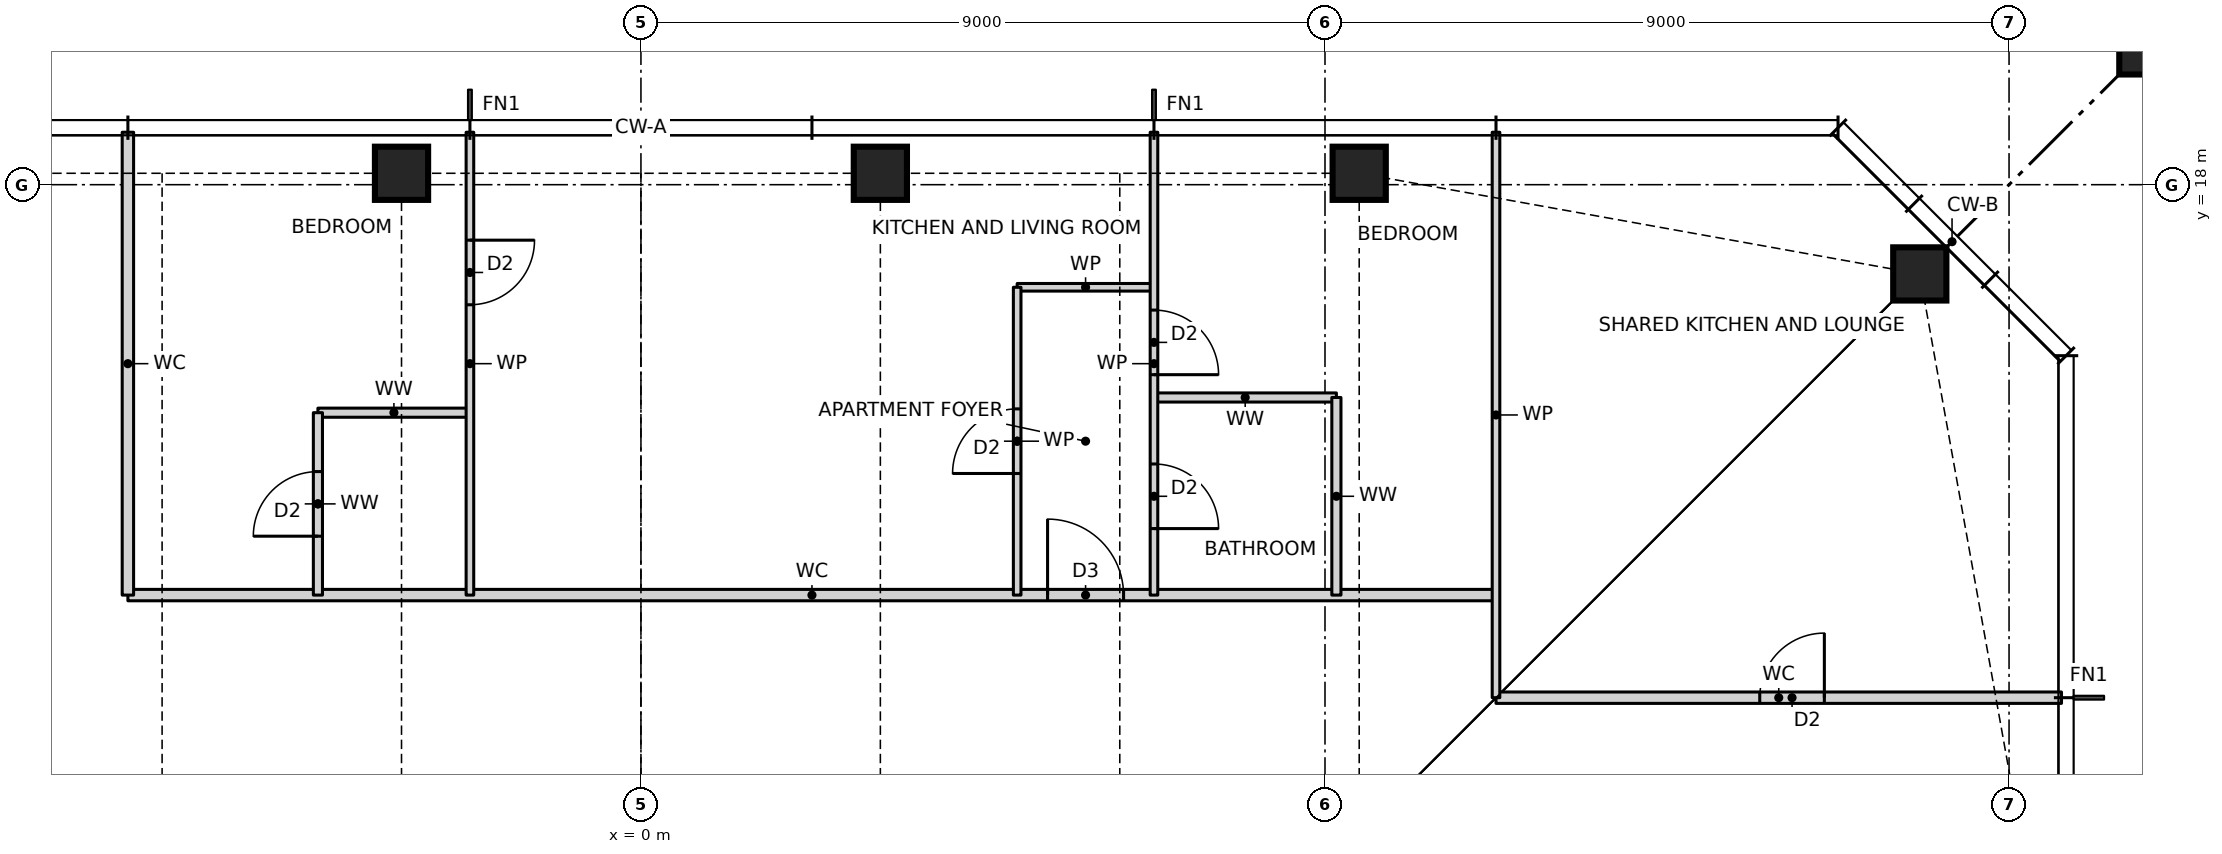
"""IFC4 building model, lengths in metres.
Left out: names, types, materials, properties, quantities, classifications, styles, units other than length and angle.
Written with IfcOpenShell. Run it as: python <this file> out.ifc"""

import sys

from ifc_helpers import new_model, si_unit, direction, frame, frame_2d, origin, origin_2d, place, context, subcontext, project, spatial, rectangle, hollow_rectangle, i_section, extrude, element, fill, save


model = new_model("IFC4")
c1 = context("Model", 3, precision=1e-05, world=origin(), true_north=direction((0.0, 1.0)))
c2 = subcontext(c1, "Body", "Model", "MODEL_VIEW")
j1 = project(units=[si_unit("LENGTHUNIT", "METRE"), si_unit("PLANEANGLEUNIT", "RADIAN")], contexts=[c1])
p1 = place(None, origin())
s1 = spatial("IfcSite", under=j1, at=p1, CompositionType="ELEMENT")
p2 = place(p1, origin())
s2 = spatial("IfcBuilding", under=s1, at=p2, CompositionType="ELEMENT")
p3 = place(p2, frame((0.0, 0.0, 174.0)))
s3 = spatial("IfcBuildingStorey", under=s2, at=p3, CompositionType="ELEMENT", Elevation=174.0)
for number, where, z_axis, x_axis in (
    (1, (16.826, 16.826, 0.0), (0.0, 0.0, 1.0), (1.0, 0.0, 0.0)),
    (2, (9.45, 18.15, 0.0), (0.0, 0.0, 1.0), (1.0, 0.0, 0.0)),
    (3, (3.15, 18.15, 0.0), (0.0, 0.0, 1.0), (1.0, 0.0, 0.0)),
    (4, (-3.15, 18.15, 0.0), (0.0, 0.0, 1.0), (1.0, 0.0, 0.0)),
):
    element("IfcColumn", number, at=place(p3, frame(where, z_axis=z_axis, x_axis=x_axis)), inside=s3, PredefinedType="COLUMN", context=c2, shape_type="SweptSolid", body=[
        extrude(hollow_rectangle(XDim=0.7, YDim=0.7, WallThickness=0.06, at=origin_2d()), origin(), (0.0, 0.0, 1.0), 3.5),
    ])
p4 = place(p3, frame((21.65, 21.65, 0.0), z_axis=(0.0, 0.0, 1.0), x_axis=(1.0, 0.0, 0.0)))
e5 = element("IfcColumn", 5, at=p4, inside=s3, PredefinedType="COLUMN", context=c2, shape_type="SweptSolid", body=[
    extrude(rectangle(XDim=4.4, YDim=4.4, at=origin_2d()), origin(), (0.0, 0.0, 1.0), 3.5),
    extrude(i_section(OverallWidth=0.478, OverallDepth=0.599, WebThickness=0.1, FlangeThickness=0.14, at=origin_2d()), origin(), (0.0, 0.0, 1.0), 3.5),
])
p5 = place(p3, frame((11.25, 11.25, 0.0), z_axis=(0.0, 0.0, 1.0), x_axis=(1.0, 0.0, 0.0)))
e6 = element("IfcWall", 6, at=p5, inside=s3, PredefinedType="PARTITIONING", context=c2, shape_type="SweptSolid", body=[
    extrude(rectangle(XDim=7.44, YDim=0.15, at=frame_2d((3.72, 0.0))), origin(), (0.0, 0.0, 1.0), 3.27),
])
p6 = place(p5, frame((3.47, 0.0, 0.0)))
e7 = element("IfcOpeningElement", 7, at=p6, cuts=e6, PredefinedType="OPENING", context=c2, shape_type="SweptSolid", body=[
    extrude(rectangle(XDim=0.85, YDim=2.1, at=frame_2d((0.425, 1.05))), frame((0.0, 0.085, 0.0), z_axis=(0.0, -1.0, 0.0), x_axis=(1.0, 0.0, 0.0)), (0.0, 0.0, 1.0), 0.17),
])
p7 = place(p3, frame((-6.75, 12.6, 0.0), z_axis=(0.0, 0.0, 1.0), x_axis=(1.0, 0.0, 0.0)))
e8 = element("IfcWall", 8, at=p7, inside=s3, PredefinedType="PARTITIONING", context=c2, shape_type="SweptSolid", body=[
    extrude(rectangle(XDim=18.0, YDim=0.15, at=frame_2d((9.0, 0.0))), origin(), (0.0, 0.0, 1.0), 3.27),
])
p8 = place(p7, frame((12.1, 0.0, 0.0)))
e9 = element("IfcOpeningElement", 9, at=p8, cuts=e8, PredefinedType="OPENING", context=c2, shape_type="SweptSolid", body=[
    extrude(rectangle(XDim=1.0, YDim=2.1, at=frame_2d((0.5, 1.05))), frame((0.0, 0.085, 0.0), z_axis=(0.0, -1.0, 0.0), x_axis=(1.0, 0.0, 0.0)), (0.0, 0.0, 1.0), 0.17),
])
p9 = place(p3, frame((-4.25, 15.0, 0.0), z_axis=(0.0, 0.0, 1.0), x_axis=(1.0, 0.0, 0.0)))
e10 = element("IfcWall", 10, at=p9, inside=s3, PredefinedType="PARTITIONING", context=c2, shape_type="SweptSolid", body=[
    extrude(rectangle(XDim=2.0, YDim=0.12, at=frame_2d((1.0, 0.0))), origin(), (0.0, 0.0, 1.0), 3.27),
])
p10 = place(p3, frame((6.75, 15.2, 0.0), z_axis=(0.0, 0.0, 1.0), x_axis=(1.0, 0.0, 0.0)))
e11 = element("IfcWall", 11, at=p10, inside=s3, PredefinedType="PARTITIONING", context=c2, shape_type="SweptSolid", body=[
    extrude(rectangle(XDim=2.4, YDim=0.12, at=frame_2d((1.2, 0.0))), origin(), (0.0, 0.0, 1.0), 3.27),
])
p11 = place(p3, frame((4.95, 16.65, 0.0), z_axis=(0.0, 0.0, 1.0), x_axis=(1.0, 0.0, 0.0)))
e12 = element("IfcWall", 12, at=p11, inside=s3, PredefinedType="PARTITIONING", context=c2, shape_type="SweptSolid", body=[
    extrude(rectangle(XDim=1.8, YDim=0.1, at=frame_2d((0.9, 0.0))), origin(), (0.0, 0.0, 1.0), 3.27),
])
p12 = place(p3, frame((11.25, 11.25, 0.0), z_axis=(0.0, 0.0, 1.0), x_axis=(0.0, 1.0, 0.0)))
e13 = element("IfcWall", 13, at=p12, inside=s3, PredefinedType="PARTITIONING", context=c2, shape_type="SweptSolid", body=[
    extrude(rectangle(XDim=7.44, YDim=0.1, at=frame_2d((3.72, 0.0))), origin(), (0.0, 0.0, 1.0), 3.27),
])
p13 = place(p3, frame((9.15, 12.6, 0.0), z_axis=(0.0, 0.0, 1.0), x_axis=(0.0, 1.0, 0.0)))
e14 = element("IfcWall", 14, at=p13, inside=s3, PredefinedType="PARTITIONING", context=c2, shape_type="SweptSolid", body=[
    extrude(rectangle(XDim=2.6, YDim=0.12, at=frame_2d((1.3, 0.0))), origin(), (0.0, 0.0, 1.0), 3.27),
])
p14 = place(p3, frame((6.75, 12.6, 0.0), z_axis=(0.0, 0.0, 1.0), x_axis=(0.0, 1.0, 0.0)))
e15 = element("IfcWall", 15, at=p14, inside=s3, PredefinedType="PARTITIONING", context=c2, shape_type="SweptSolid", body=[
    extrude(rectangle(XDim=6.09, YDim=0.1, at=frame_2d((3.045, 0.0))), origin(), (0.0, 0.0, 1.0), 3.27),
])
p15 = place(p14, frame((2.9, 0.0, 0.0)))
e16 = element("IfcOpeningElement", 16, at=p15, cuts=e15, PredefinedType="OPENING", context=c2, shape_type="SweptSolid", body=[
    extrude(rectangle(XDim=0.85, YDim=2.1, at=frame_2d((0.425, 1.05))), frame((0.0, 0.06, 0.0), z_axis=(0.0, -1.0, 0.0), x_axis=(1.0, 0.0, 0.0)), (0.0, 0.0, 1.0), 0.12),
])
p16 = place(p14, frame((0.875, 0.0, 0.0)))
e17 = element("IfcOpeningElement", 17, at=p16, cuts=e15, PredefinedType="OPENING", context=c2, shape_type="SweptSolid", body=[
    extrude(rectangle(XDim=0.85, YDim=2.1, at=frame_2d((0.425, 1.05))), frame((0.0, 0.06, 0.0), z_axis=(0.0, -1.0, 0.0), x_axis=(1.0, 0.0, 0.0)), (0.0, 0.0, 1.0), 0.12),
])
p17 = place(p3, frame((4.95, 12.6, 0.0), z_axis=(0.0, 0.0, 1.0), x_axis=(0.0, 1.0, 0.0)))
e18 = element("IfcWall", 18, at=p17, inside=s3, PredefinedType="PARTITIONING", context=c2, shape_type="SweptSolid", body=[
    extrude(rectangle(XDim=4.05, YDim=0.1, at=frame_2d((2.025, 0.0))), origin(), (0.0, 0.0, 1.0), 3.27),
])
p18 = place(p17, frame((1.6, 0.0, 0.0)))
e19 = element("IfcOpeningElement", 19, at=p18, cuts=e18, PredefinedType="OPENING", context=c2, shape_type="SweptSolid", body=[
    extrude(rectangle(XDim=0.85, YDim=2.1, at=frame_2d((0.425, 1.05))), frame((0.0, 0.06, 0.0), z_axis=(0.0, -1.0, 0.0), x_axis=(1.0, 0.0, 0.0)), (0.0, 0.0, 1.0), 0.12),
])
p19 = place(p3, frame((-2.25, 12.6, 0.0), z_axis=(0.0, 0.0, 1.0), x_axis=(0.0, 1.0, 0.0)))
e20 = element("IfcWall", 20, at=p19, inside=s3, PredefinedType="PARTITIONING", context=c2, shape_type="SweptSolid", body=[
    extrude(rectangle(XDim=6.09, YDim=0.1, at=frame_2d((3.045, 0.0))), origin(), (0.0, 0.0, 1.0), 3.27),
])
p20 = place(p19, frame((3.82, 0.0, 0.0)))
e21 = element("IfcOpeningElement", 21, at=p20, cuts=e20, PredefinedType="OPENING", context=c2, shape_type="SweptSolid", body=[
    extrude(rectangle(XDim=0.85, YDim=2.1, at=frame_2d((0.425, 1.05))), frame((0.0, 0.06, 0.0), z_axis=(0.0, -1.0, 0.0), x_axis=(1.0, 0.0, 0.0)), (0.0, 0.0, 1.0), 0.12),
])
p21 = place(p3, frame((-4.25, 12.6, 0.0), z_axis=(0.0, 0.0, 1.0), x_axis=(0.0, 1.0, 0.0)))
e22 = element("IfcWall", 22, at=p21, inside=s3, PredefinedType="PARTITIONING", context=c2, shape_type="SweptSolid", body=[
    extrude(rectangle(XDim=2.4, YDim=0.12, at=frame_2d((1.2, 0.0))), origin(), (0.0, 0.0, 1.0), 3.27),
])
p22 = place(p21, frame((0.775, 0.0, 0.0)))
e23 = element("IfcOpeningElement", 23, at=p22, cuts=e22, PredefinedType="OPENING", context=c2, shape_type="SweptSolid", body=[
    extrude(rectangle(XDim=0.85, YDim=2.1, at=frame_2d((0.425, 1.05))), frame((0.0, 0.07, 0.0), z_axis=(0.0, -1.0, 0.0), x_axis=(1.0, 0.0, 0.0)), (0.0, 0.0, 1.0), 0.14),
])
p23 = place(p3, frame((-6.75, 12.6, 0.0), z_axis=(0.0, 0.0, 1.0), x_axis=(0.0, 1.0, 0.0)))
e24 = element("IfcWall", 24, at=p23, inside=s3, PredefinedType="PARTITIONING", context=c2, shape_type="SweptSolid", body=[
    extrude(rectangle(XDim=6.09, YDim=0.15, at=frame_2d((3.045, 0.0))), origin(), (0.0, 0.0, 1.0), 3.27),
])
p24 = place(p8, origin())
e25 = element("IfcDoor", 25, at=p24, inside=s3, OperationType="SINGLE_SWING_LEFT", PredefinedType="DOOR", context=c2, shape_type="SweptSolid", body=[
    extrude(rectangle(XDim=1.0, YDim=2.1, at=frame_2d((0.5, 1.05))), frame((0.0, 0.025, 0.0), z_axis=(0.0, -1.0, 0.0), x_axis=(1.0, 0.0, 0.0)), (0.0, 0.0, 1.0), 0.05),
])
fill(e9, e25)
p25 = place(p18, origin())
e26 = element("IfcDoor", 26, at=p25, inside=s3, OperationType="SINGLE_SWING_LEFT", PredefinedType="DOOR", context=c2, shape_type="SweptSolid", body=[
    extrude(rectangle(XDim=0.85, YDim=2.1, at=frame_2d((0.425, 1.05))), frame((0.0, 0.025, 0.0), z_axis=(0.0, -1.0, 0.0), x_axis=(1.0, 0.0, 0.0)), (0.0, 0.0, 1.0), 0.05),
])
fill(e19, e26)
p26 = place(p15, frame((0.85, 0.0, 0.0), z_axis=(0.0, 0.0, 1.0), x_axis=(-1.0, 0.0, 0.0)))
e27 = element("IfcDoor", 27, at=p26, inside=s3, OperationType="SINGLE_SWING_RIGHT", PredefinedType="DOOR", context=c2, shape_type="SweptSolid", body=[
    extrude(rectangle(XDim=0.85, YDim=2.1, at=frame_2d((0.425, 1.05))), frame((0.0, 0.025, 0.0), z_axis=(0.0, -1.0, 0.0), x_axis=(1.0, 0.0, 0.0)), (0.0, 0.0, 1.0), 0.05),
])
fill(e16, e27)
p27 = place(p16, frame((0.85, 0.0, 0.0), z_axis=(0.0, 0.0, 1.0), x_axis=(-1.0, 0.0, 0.0)))
e28 = element("IfcDoor", 28, at=p27, inside=s3, OperationType="SINGLE_SWING_RIGHT", PredefinedType="DOOR", context=c2, shape_type="SweptSolid", body=[
    extrude(rectangle(XDim=0.85, YDim=2.1, at=frame_2d((0.425, 1.05))), frame((0.0, 0.025, 0.0), z_axis=(0.0, -1.0, 0.0), x_axis=(1.0, 0.0, 0.0)), (0.0, 0.0, 1.0), 0.05),
])
fill(e17, e28)
p28 = place(p20, frame((0.85, 0.0, 0.0), z_axis=(0.0, 0.0, 1.0), x_axis=(-1.0, 0.0, 0.0)))
e29 = element("IfcDoor", 29, at=p28, inside=s3, OperationType="SINGLE_SWING_LEFT", PredefinedType="DOOR", context=c2, shape_type="SweptSolid", body=[
    extrude(rectangle(XDim=0.85, YDim=2.1, at=frame_2d((0.425, 1.05))), frame((0.0, 0.025, 0.0), z_axis=(0.0, -1.0, 0.0), x_axis=(1.0, 0.0, 0.0)), (0.0, 0.0, 1.0), 0.05),
])
fill(e21, e29)
p29 = place(p22, origin())
e30 = element("IfcDoor", 30, at=p29, inside=s3, OperationType="SINGLE_SWING_LEFT", PredefinedType="DOOR", context=c2, shape_type="SweptSolid", body=[
    extrude(rectangle(XDim=0.85, YDim=2.1, at=frame_2d((0.425, 1.05))), frame((0.0, 0.025, 0.0), z_axis=(0.0, -1.0, 0.0), x_axis=(1.0, 0.0, 0.0)), (0.0, 0.0, 1.0), 0.05),
])
fill(e23, e30)
p30 = place(p6, origin())
e31 = element("IfcDoor", 31, at=p30, inside=s3, OperationType="SINGLE_SWING_RIGHT", PredefinedType="DOOR", context=c2, shape_type="SweptSolid", body=[
    extrude(rectangle(XDim=0.85, YDim=2.1, at=frame_2d((0.425, 1.05))), frame((0.0, 0.025, 0.0), z_axis=(0.0, -1.0, 0.0), x_axis=(1.0, 0.0, 0.0)), (0.0, 0.0, 1.0), 0.05),
])
fill(e7, e31)
save(model, sys.argv[1])
